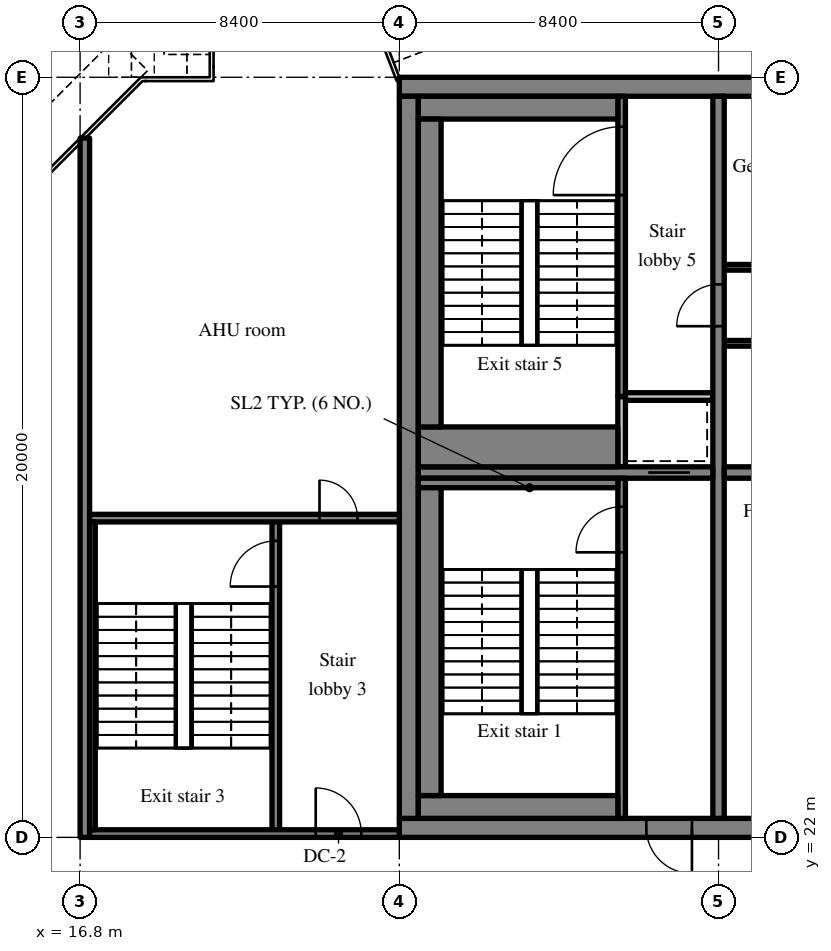
"""IFC4 building model, lengths in metres.
Left out: names, types, materials, properties, quantities, classifications, styles, units other than length and angle.
Written with IfcOpenShell. Run it as: python <this file> out.ifc"""

import sys

from ifc_helpers import new_model, si_unit, direction, frame, frame_2d, origin, place, context, subcontext, project, spatial, rectangle, extrude, source, transform, mapped, element, fill, save


model = new_model("IFC4")
c1 = context("Model", 3, precision=1e-05, world=origin(), true_north=direction((0.0, 1.0)))
c2 = subcontext(c1, "Body", "Model", "MODEL_VIEW")
j1 = project(units=[si_unit("LENGTHUNIT", "METRE"), si_unit("PLANEANGLEUNIT", "RADIAN")], contexts=[c1])
p1 = place(None, origin())
s1 = spatial("IfcSite", under=j1, at=p1, CompositionType="ELEMENT")
p2 = place(p1, origin())
s2 = spatial("IfcBuilding", under=s1, at=p2, CompositionType="ELEMENT")
p3 = place(p2, frame((0.0, 0.0, 317.7)))
s3 = spatial("IfcBuildingStorey", under=s2, at=p3, CompositionType="ELEMENT", Elevation=317.7)
m1 = source(origin(), c2, "Body", "SweptSolid", [
    extrude(rectangle(XDim=50.4, YDim=0.5, at=frame_2d((25.2, 0.0))), origin(), (0.0, 0.0, 1.0), 5.72),
])
p4 = place(p3, frame((25.2, 22.25, 0.0), z_axis=(0.0, 0.0, 1.0), x_axis=(1.0, 0.0, 0.0)))
e1 = element("IfcWall", 1, at=p4, inside=s3, PredefinedType="SHEAR", context=c2, shape_type="MappedRepresentation", body=[
    mapped(m1, transform((0.0, 0.0, 0.0), scale=1.0)),
])
m2 = source(origin(), c2, "Body", "SweptSolid", [
    extrude(rectangle(XDim=1.8, YDim=2.1, at=frame_2d((0.9, 1.05))), frame((0.0, 0.26, 0.0), z_axis=(0.0, -1.0, 0.0), x_axis=(1.0, 0.0, 0.0)), (0.0, 0.0, 1.0), 0.52),
])
p5 = place(p4, frame((15.9, 0.0, 0.0)))
e2 = element("IfcOpeningElement", 2, at=p5, cuts=e1, PredefinedType="OPENING", context=c2, shape_type="MappedRepresentation", body=[
    mapped(m2, transform((0.0, 0.0, 0.0), scale=1.0)),
])
m3 = source(origin(), c2, "Body", "SweptSolid", [
    extrude(rectangle(XDim=0.9, YDim=2.1, at=frame_2d((0.45, 1.05))), frame((0.0, 0.26, 0.0), z_axis=(0.0, -1.0, 0.0), x_axis=(1.0, 0.0, 0.0)), (0.0, 0.0, 1.0), 0.52),
])
p6 = place(p4, frame((21.525, 0.0, 0.0)))
e3 = element("IfcOpeningElement", 3, at=p6, cuts=e1, PredefinedType="OPENING", context=c2, shape_type="MappedRepresentation", body=[
    mapped(m3, transform((0.0, 0.0, 0.0), scale=1.0)),
])
p7 = place(p4, frame((32.7, 0.0, 0.0)))
e4 = element("IfcOpeningElement", 4, at=p7, cuts=e1, PredefinedType="OPENING", context=c2, shape_type="MappedRepresentation", body=[
    mapped(m2, transform((0.0, 0.0, 0.0), scale=1.0)),
])
m4 = source(origin(), c2, "Body", "SweptSolid", [
    extrude(rectangle(XDim=1.2, YDim=2.1, at=frame_2d((0.6, 1.05))), frame((0.0, 0.26, 0.0), z_axis=(0.0, -1.0, 0.0), x_axis=(1.0, 0.0, 0.0)), (0.0, 0.0, 1.0), 0.52),
])
p8 = place(p4, frame((6.5, 0.0, 0.0)))
e5 = element("IfcOpeningElement", 5, at=p8, cuts=e1, PredefinedType="OPENING", context=c2, shape_type="MappedRepresentation", body=[
    mapped(m4, transform((0.0, 0.0, 0.0), scale=1.0)),
])
p9 = place(p4, frame((47.975, 0.0, 0.0)))
e6 = element("IfcOpeningElement", 6, at=p9, cuts=e1, PredefinedType="OPENING", context=c2, shape_type="MappedRepresentation", body=[
    mapped(m4, transform((0.0, 0.0, 0.0), scale=1.0)),
])
p10 = place(p3, frame((25.2, 41.75, 0.0), z_axis=(0.0, 0.0, 1.0), x_axis=(1.0, 0.0, 0.0)))
e7 = element("IfcWall", 7, at=p10, inside=s3, PredefinedType="SHEAR", context=c2, shape_type="MappedRepresentation", body=[
    mapped(m1, transform((0.0, 0.0, 0.0), scale=1.0)),
])
m5 = source(origin(), c2, "Body", "SweptSolid", [
    extrude(rectangle(XDim=19.0, YDim=0.5, at=frame_2d((9.5, 0.0))), origin(), (0.0, 0.0, 1.0), 5.72),
])
p11 = place(p3, frame((25.45, 22.5, 0.0), z_axis=(0.0, 0.0, 1.0), x_axis=(0.0, 1.0, 0.0)))
e8 = element("IfcWall", 8, at=p11, inside=s3, PredefinedType="SHEAR", context=c2, shape_type="MappedRepresentation", body=[
    mapped(m5, transform((0.0, 0.0, 0.0), scale=1.0)),
])
m6 = source(origin(), c2, "Body", "SweptSolid", [
    extrude(rectangle(XDim=19.0, YDim=0.3, at=frame_2d((9.5, 0.0))), origin(), (0.0, 0.0, 1.0), 5.72),
])
p12 = place(p3, frame((33.6, 22.5, 0.0), z_axis=(0.0, 0.0, 1.0), x_axis=(0.0, 1.0, 0.0)))
e9 = element("IfcWall", 9, at=p12, inside=s3, PredefinedType="SHEAR", context=c2, shape_type="MappedRepresentation", body=[
    mapped(m6, transform((0.0, 0.0, 0.0), scale=1.0)),
])
m7 = source(origin(), c2, "Body", "SweptSolid", [
    extrude(rectangle(XDim=1.1, YDim=2.1, at=frame_2d((0.55, 1.05))), frame((0.0, 0.16, 0.0), z_axis=(0.0, -1.0, 0.0), x_axis=(1.0, 0.0, 0.0)), (0.0, 0.0, 1.0), 0.32),
])
p13 = place(p12, frame((12.95, 0.0, 0.0)))
e10 = element("IfcOpeningElement", 10, at=p13, cuts=e9, PredefinedType="OPENING", context=c2, shape_type="MappedRepresentation", body=[
    mapped(m7, transform((0.0, 0.0, 0.0), scale=1.0)),
])
m8 = source(origin(), c2, "Body", "SweptSolid", [
    extrude(rectangle(XDim=7.75, YDim=0.3, at=frame_2d((3.875, 0.0))), origin(), (0.0, 0.0, 1.0), 5.72),
])
p14 = place(p3, frame((25.7, 31.6, 0.0), z_axis=(0.0, 0.0, 1.0), x_axis=(1.0, 0.0, 0.0)))
e11 = element("IfcWall", 11, at=p14, inside=s3, PredefinedType="SHEAR", context=c2, shape_type="MappedRepresentation", body=[
    mapped(m8, transform((0.0, 0.0, 0.0), scale=1.0)),
])
p15 = place(p14, frame((6.05, 0.0, 0.0)))
e12 = element("IfcOpeningElement", 12, at=p15, cuts=e11, PredefinedType="OPENING", context=c2, shape_type="MappedRepresentation", body=[
    mapped(m7, transform((0.0, 0.0, 0.0), scale=1.0)),
])
m9 = source(origin(), c2, "Body", "SweptSolid", [
    extrude(rectangle(XDim=16.5, YDim=0.3, at=frame_2d((8.25, 0.0))), origin(), (0.0, 0.0, 1.0), 5.72),
])
p16 = place(p3, frame((33.75, 31.6, 0.0), z_axis=(0.0, 0.0, 1.0), x_axis=(1.0, 0.0, 0.0)))
e13 = element("IfcWall", 13, at=p16, inside=s3, PredefinedType="SHEAR", context=c2, shape_type="MappedRepresentation", body=[
    mapped(m9, transform((0.0, 0.0, 0.0), scale=1.0)),
])
m10 = source(origin(), c2, "Body", "SweptSolid", [
    extrude(rectangle(XDim=1.0, YDim=2.1, at=frame_2d((0.5, 1.05))), frame((0.0, 0.16, 0.0), z_axis=(0.0, -1.0, 0.0), x_axis=(1.0, 0.0, 0.0)), (0.0, 0.0, 1.0), 0.32),
])
p17 = place(p16, frame((14.875, 0.0, 0.0)))
e14 = element("IfcOpeningElement", 14, at=p17, cuts=e13, PredefinedType="OPENING", context=c2, shape_type="MappedRepresentation", body=[
    mapped(m10, transform((0.0, 0.0, 0.0), scale=1.0)),
])
m11 = source(origin(), c2, "Body", "SweptSolid", [
    extrude(rectangle(XDim=18.4, YDim=0.25, at=frame_2d((9.2, 0.0))), origin(), (0.0, 0.0, 1.0), 5.72),
])
p18 = place(p3, frame((16.925, 22.0, 0.0), z_axis=(0.0, 0.0, 1.0), x_axis=(0.0, 1.0, 0.0)))
e15 = element("IfcWall", 15, at=p18, inside=s3, PredefinedType="SHEAR", context=c2, shape_type="MappedRepresentation", body=[
    mapped(m11, transform((0.0, 0.0, 0.0), scale=1.0)),
])
m12 = source(origin(), c2, "Body", "SweptSolid", [
    extrude(rectangle(XDim=14.25, YDim=0.15, at=frame_2d((7.125, 0.0))), origin(), (0.0, 0.0, 1.0), 5.72),
])
p19 = place(p3, frame((33.75, 35.0, 0.0), z_axis=(0.0, 0.0, 1.0), x_axis=(1.0, 0.0, 0.0)))
e16 = element("IfcWall", 16, at=p19, inside=s3, PredefinedType="PARTITIONING", context=c2, shape_type="MappedRepresentation", body=[
    mapped(m12, transform((0.0, 0.0, 0.0), scale=1.0)),
])
m13 = source(origin(), c2, "Body", "SweptSolid", [
    extrude(rectangle(XDim=0.9, YDim=2.1, at=frame_2d((0.45, 1.05))), frame((0.0, 0.085, 0.0), z_axis=(0.0, -1.0, 0.0), x_axis=(1.0, 0.0, 0.0)), (0.0, 0.0, 1.0), 0.17),
])
p20 = place(p19, frame((6.637, 0.0, 0.0)))
e17 = element("IfcOpeningElement", 17, at=p20, cuts=e16, PredefinedType="OPENING", context=c2, shape_type="MappedRepresentation", body=[
    mapped(m13, transform((0.0, 0.0, 0.0), scale=1.0)),
])
m14 = source(origin(), c2, "Body", "SweptSolid", [
    extrude(rectangle(XDim=16.5, YDim=0.15, at=frame_2d((8.25, 0.0))), origin(), (0.0, 0.0, 1.0), 5.72),
])
p21 = place(p3, frame((33.75, 37.0, 0.0), z_axis=(0.0, 0.0, 1.0), x_axis=(1.0, 0.0, 0.0)))
e18 = element("IfcWall", 18, at=p21, inside=s3, PredefinedType="PARTITIONING", context=c2, shape_type="MappedRepresentation", body=[
    mapped(m14, transform((0.0, 0.0, 0.0), scale=1.0)),
])
p22 = place(p21, frame((0.787, 0.0, 0.0)))
e19 = element("IfcOpeningElement", 19, at=p22, cuts=e18, PredefinedType="OPENING", context=c2, shape_type="MappedRepresentation", body=[
    mapped(m13, transform((0.0, 0.0, 0.0), scale=1.0)),
])
p23 = place(p21, frame((3.675, 0.0, 0.0)))
e20 = element("IfcOpeningElement", 20, at=p23, cuts=e18, PredefinedType="OPENING", context=c2, shape_type="MappedRepresentation", body=[
    mapped(m13, transform((0.0, 0.0, 0.0), scale=1.0)),
])
p24 = place(p21, frame((9.45, 0.0, 0.0)))
e21 = element("IfcOpeningElement", 21, at=p24, cuts=e18, PredefinedType="OPENING", context=c2, shape_type="MappedRepresentation", body=[
    mapped(m13, transform((0.0, 0.0, 0.0), scale=1.0)),
])
p25 = place(p21, frame((14.813, 0.0, 0.0)))
e22 = element("IfcOpeningElement", 22, at=p25, cuts=e18, PredefinedType="OPENING", context=c2, shape_type="MappedRepresentation", body=[
    mapped(m13, transform((0.0, 0.0, 0.0), scale=1.0)),
])
m15 = source(origin(), c2, "Body", "SweptSolid", [
    extrude(rectangle(XDim=8.95, YDim=0.2, at=frame_2d((4.475, 0.0))), origin(), (0.0, 0.0, 1.0), 5.72),
])
p26 = place(p3, frame((31.05, 22.5, 0.0), z_axis=(0.0, 0.0, 1.0), x_axis=(0.0, 1.0, 0.0)))
e23 = element("IfcWall", 23, at=p26, inside=s3, PredefinedType="SOLIDWALL", context=c2, shape_type="MappedRepresentation", body=[
    mapped(m15, transform((0.0, 0.0, 0.0), scale=1.0)),
])
m16 = source(origin(), c2, "Body", "SweptSolid", [
    extrude(rectangle(XDim=1.2, YDim=2.1, at=frame_2d((0.6, 1.05))), frame((0.0, 0.11, 0.0), z_axis=(0.0, -1.0, 0.0), x_axis=(1.0, 0.0, 0.0)), (0.0, 0.0, 1.0), 0.22),
])
p27 = place(p26, frame((7.0, 0.0, 0.0)))
e24 = element("IfcOpeningElement", 24, at=p27, cuts=e23, PredefinedType="OPENING", context=c2, shape_type="MappedRepresentation", body=[
    mapped(m16, transform((0.0, 0.0, 0.0), scale=1.0)),
])
m17 = source(origin(), c2, "Body", "SweptSolid", [
    extrude(rectangle(XDim=1.85, YDim=0.2, at=frame_2d((0.925, 0.0))), origin(), (0.0, 0.0, 1.0), 5.72),
])
p28 = place(p3, frame((31.05, 31.75, 0.0), z_axis=(0.0, 0.0, 1.0), x_axis=(0.0, 1.0, 0.0)))
e25 = element("IfcWall", 25, at=p28, inside=s3, PredefinedType="SOLIDWALL", context=c2, shape_type="MappedRepresentation", body=[
    mapped(m17, transform((0.0, 0.0, 0.0), scale=1.0)),
])
m18 = source(origin(), c2, "Body", "SweptSolid", [
    extrude(rectangle(XDim=2.3, YDim=0.2, at=frame_2d((1.15, 0.0))), origin(), (0.0, 0.0, 1.0), 5.72),
])
p29 = place(p3, frame((31.15, 33.6, 0.0), z_axis=(0.0, 0.0, 1.0), x_axis=(1.0, 0.0, 0.0)))
e26 = element("IfcWall", 26, at=p29, inside=s3, PredefinedType="SOLIDWALL", context=c2, shape_type="MappedRepresentation", body=[
    mapped(m18, transform((0.0, 0.0, 0.0), scale=1.0)),
])
m19 = source(origin(), c2, "Body", "SweptSolid", [
    extrude(rectangle(XDim=7.9, YDim=0.2, at=frame_2d((3.95, 0.0))), origin(), (0.0, 0.0, 1.0), 5.72),
])
p30 = place(p3, frame((31.05, 33.6, 0.0), z_axis=(0.0, 0.0, 1.0), x_axis=(0.0, 1.0, 0.0)))
e27 = element("IfcWall", 27, at=p30, inside=s3, PredefinedType="SOLIDWALL", context=c2, shape_type="MappedRepresentation", body=[
    mapped(m19, transform((0.0, 0.0, 0.0), scale=1.0)),
])
m20 = source(origin(), c2, "Body", "SweptSolid", [
    extrude(rectangle(XDim=1.8, YDim=2.1, at=frame_2d((0.9, 1.05))), frame((0.0, 0.11, 0.0), z_axis=(0.0, -1.0, 0.0), x_axis=(1.0, 0.0, 0.0)), (0.0, 0.0, 1.0), 0.22),
])
p31 = place(p30, frame((5.3, 0.0, 0.0)))
e28 = element("IfcOpeningElement", 28, at=p31, cuts=e27, PredefinedType="OPENING", context=c2, shape_type="MappedRepresentation", body=[
    mapped(m20, transform((0.0, 0.0, 0.0), scale=1.0)),
])
m21 = source(origin(), c2, "Body", "SweptSolid", [
    extrude(rectangle(XDim=8.3, YDim=0.2, at=frame_2d((4.15, 0.0))), origin(), (0.0, 0.0, 1.0), 5.72),
])
p32 = place(p3, frame((21.95, 22.1, 0.0), z_axis=(0.0, 0.0, 1.0), x_axis=(0.0, 1.0, 0.0)))
e29 = element("IfcWall", 29, at=p32, inside=s3, PredefinedType="SOLIDWALL", context=c2, shape_type="MappedRepresentation", body=[
    mapped(m21, transform((0.0, 0.0, 0.0), scale=1.0)),
])
p33 = place(p32, frame((6.5, 0.0, 0.0)))
e30 = element("IfcOpeningElement", 30, at=p33, cuts=e29, PredefinedType="OPENING", context=c2, shape_type="MappedRepresentation", body=[
    mapped(m16, transform((0.0, 0.0, 0.0), scale=1.0)),
])
m22 = source(origin(), c2, "Body", "SweptSolid", [
    extrude(rectangle(XDim=8.15, YDim=0.2, at=frame_2d((4.075, 0.0))), origin(), (0.0, 0.0, 1.0), 5.72),
])
p34 = place(p3, frame((17.05, 22.1, 0.0), z_axis=(0.0, 0.0, 1.0), x_axis=(1.0, 0.0, 0.0)))
e31 = element("IfcWall", 31, at=p34, inside=s3, PredefinedType="SOLIDWALL", context=c2, shape_type="MappedRepresentation", body=[
    mapped(m22, transform((0.0, 0.0, 0.0), scale=1.0)),
])
p35 = place(p34, frame((5.95, 0.0, 0.0)))
e32 = element("IfcOpeningElement", 32, at=p35, cuts=e31, PredefinedType="OPENING", context=c2, shape_type="MappedRepresentation", body=[
    mapped(m16, transform((0.0, 0.0, 0.0), scale=1.0)),
])
p36 = place(p3, frame((17.05, 30.4, 0.0), z_axis=(0.0, 0.0, 1.0), x_axis=(1.0, 0.0, 0.0)))
e33 = element("IfcWall", 33, at=p36, inside=s3, PredefinedType="SOLIDWALL", context=c2, shape_type="MappedRepresentation", body=[
    mapped(m22, transform((0.0, 0.0, 0.0), scale=1.0)),
])
m23 = source(origin(), c2, "Body", "SweptSolid", [
    extrude(rectangle(XDim=1.0, YDim=2.1, at=frame_2d((0.5, 1.05))), frame((0.0, 0.11, 0.0), z_axis=(0.0, -1.0, 0.0), x_axis=(1.0, 0.0, 0.0)), (0.0, 0.0, 1.0), 0.22),
])
p37 = place(p36, frame((6.05, 0.0, 0.0)))
e34 = element("IfcOpeningElement", 34, at=p37, cuts=e33, PredefinedType="OPENING", context=c2, shape_type="MappedRepresentation", body=[
    mapped(m23, transform((0.0, 0.0, 0.0), scale=1.0)),
])
m24 = source(origin(), c2, "Body", "SweptSolid", [
    extrude(rectangle(XDim=5.25, YDim=0.6, at=frame_2d((2.625, 0.0))), origin(), (0.0, 0.0, 1.0), 5.72),
])
p38 = place(p3, frame((25.7, 22.8, 0.0), z_axis=(0.0, 0.0, 1.0), x_axis=(1.0, 0.0, 0.0)))
e35 = element("IfcWall", 35, at=p38, inside=s3, PredefinedType="SOLIDWALL", context=c2, shape_type="MappedRepresentation", body=[
    mapped(m24, transform((0.0, 0.0, 0.0), scale=1.0)),
])
m25 = source(origin(), c2, "Body", "SweptSolid", [
    extrude(rectangle(XDim=5.25, YDim=0.25, at=frame_2d((2.625, 0.0))), origin(), (0.0, 0.0, 1.0), 5.72),
])
p39 = place(p3, frame((25.7, 31.325, 0.0), z_axis=(0.0, 0.0, 1.0), x_axis=(1.0, 0.0, 0.0)))
e36 = element("IfcWall", 36, at=p39, inside=s3, PredefinedType="SOLIDWALL", context=c2, shape_type="MappedRepresentation", body=[
    mapped(m25, transform((0.0, 0.0, 0.0), scale=1.0)),
])
m26 = source(origin(), c2, "Body", "SweptSolid", [
    extrude(rectangle(XDim=8.1, YDim=0.6, at=frame_2d((4.05, 0.0))), origin(), (0.0, 0.0, 1.0), 5.72),
])
p40 = place(p3, frame((26.0, 23.1, 0.0), z_axis=(0.0, 0.0, 1.0), x_axis=(0.0, 1.0, 0.0)))
e37 = element("IfcWall", 37, at=p40, inside=s3, PredefinedType="SOLIDWALL", context=c2, shape_type="MappedRepresentation", body=[
    mapped(m26, transform((0.0, 0.0, 0.0), scale=1.0)),
])
m27 = source(origin(), c2, "Body", "SweptSolid", [
    extrude(rectangle(XDim=8.1, YDim=0.15, at=frame_2d((4.05, 0.0))), origin(), (0.0, 0.0, 1.0), 5.72),
])
p41 = place(p3, frame((17.125, 22.2, 0.0), z_axis=(0.0, 0.0, 1.0), x_axis=(0.0, 1.0, 0.0)))
e38 = element("IfcWall", 38, at=p41, inside=s3, PredefinedType="SOLIDWALL", context=c2, shape_type="MappedRepresentation", body=[
    mapped(m27, transform((0.0, 0.0, 0.0), scale=1.0)),
])
p42 = place(p3, frame((25.7, 41.2, 0.0), z_axis=(0.0, 0.0, 1.0), x_axis=(1.0, 0.0, 0.0)))
e39 = element("IfcWall", 39, at=p42, inside=s3, PredefinedType="SOLIDWALL", context=c2, shape_type="MappedRepresentation", body=[
    mapped(m24, transform((0.0, 0.0, 0.0), scale=1.0)),
])
m28 = source(origin(), c2, "Body", "SweptSolid", [
    extrude(rectangle(XDim=5.25, YDim=1.05, at=frame_2d((2.625, 0.0))), origin(), (0.0, 0.0, 1.0), 5.72),
])
p43 = place(p3, frame((25.7, 32.275, 0.0), z_axis=(0.0, 0.0, 1.0), x_axis=(1.0, 0.0, 0.0)))
e40 = element("IfcWall", 40, at=p43, inside=s3, PredefinedType="SOLIDWALL", context=c2, shape_type="MappedRepresentation", body=[
    mapped(m28, transform((0.0, 0.0, 0.0), scale=1.0)),
])
p44 = place(p3, frame((26.0, 32.8, 0.0), z_axis=(0.0, 0.0, 1.0), x_axis=(0.0, 1.0, 0.0)))
e41 = element("IfcWall", 41, at=p44, inside=s3, PredefinedType="SOLIDWALL", context=c2, shape_type="MappedRepresentation", body=[
    mapped(m26, transform((0.0, 0.0, 0.0), scale=1.0)),
])
m29 = source(origin(), c2, "Body", "SweptSolid", [
    extrude(rectangle(XDim=1.2, YDim=2.1, at=frame_2d((0.6, 1.05))), frame((0.0, 0.025, 0.0), z_axis=(0.0, -1.0, 0.0), x_axis=(1.0, 0.0, 0.0)), (0.0, 0.0, 1.0), 0.05),
])
p45 = place(p27, origin())
e42 = element("IfcDoor", 42, at=p45, inside=s3, OperationType="SINGLE_SWING_LEFT", PredefinedType="DOOR", context=c2, shape_type="MappedRepresentation", body=[
    mapped(m29, transform((0.0, 0.0, 0.0), scale=1.0)),
])
fill(e24, e42)
m30 = source(origin(), c2, "Body", "SweptSolid", [
    extrude(rectangle(XDim=1.2, YDim=2.1, at=frame_2d((0.6, 1.05))), frame((0.0, 0.175, 0.0), z_axis=(0.0, -1.0, 0.0), x_axis=(1.0, 0.0, 0.0)), (0.0, 0.0, 1.0), 0.05),
])
p46 = place(p8, origin())
e43 = element("IfcDoor", 43, at=p46, inside=s3, OperationType="SINGLE_SWING_RIGHT", PredefinedType="DOOR", context=c2, shape_type="MappedRepresentation", body=[
    mapped(m30, transform((0.0, 0.0, 0.0), scale=1.0)),
])
fill(e5, e43)
m31 = source(origin(), c2, "Body", "SweptSolid", [
    extrude(rectangle(XDim=1.1, YDim=2.1, at=frame_2d((0.55, 1.05))), frame((0.0, 0.025, 0.0), z_axis=(0.0, -1.0, 0.0), x_axis=(1.0, 0.0, 0.0)), (0.0, 0.0, 1.0), 0.05),
])
p47 = place(p15, origin())
e44 = element("IfcDoor", 44, at=p47, inside=s3, OperationType="SLIDING_TO_RIGHT", PredefinedType="DOOR", context=c2, shape_type="MappedRepresentation", body=[
    mapped(m31, transform((0.0, 0.0, 0.0), scale=1.0)),
])
fill(e12, e44)
m32 = source(origin(), c2, "Body", "SweptSolid", [
    extrude(rectangle(XDim=1.8, YDim=2.1, at=frame_2d((0.9, 1.05))), frame((0.0, 0.025, 0.0), z_axis=(0.0, -1.0, 0.0), x_axis=(1.0, 0.0, 0.0)), (0.0, 0.0, 1.0), 0.05),
])
p48 = place(p31, origin())
e45 = element("IfcDoor", 45, at=p48, inside=s3, OperationType="SINGLE_SWING_LEFT", PredefinedType="DOOR", context=c2, shape_type="MappedRepresentation", body=[
    mapped(m32, transform((0.0, 0.0, 0.0), scale=1.0)),
])
fill(e28, e45)
p49 = place(p33, origin())
e46 = element("IfcDoor", 46, at=p49, inside=s3, OperationType="SINGLE_SWING_LEFT", PredefinedType="DOOR", context=c2, shape_type="MappedRepresentation", body=[
    mapped(m29, transform((0.0, 0.0, 0.0), scale=1.0)),
])
fill(e30, e46)
p50 = place(p35, origin())
e47 = element("IfcDoor", 47, at=p50, inside=s3, OperationType="SINGLE_SWING_LEFT", PredefinedType="DOOR", context=c2, shape_type="MappedRepresentation", body=[
    mapped(m29, transform((0.0, 0.0, 0.0), scale=1.0)),
])
fill(e32, e47)
m33 = source(origin(), c2, "Body", "SweptSolid", [
    extrude(rectangle(XDim=1.0, YDim=2.1, at=frame_2d((0.5, 1.05))), frame((0.0, 0.025, 0.0), z_axis=(0.0, -1.0, 0.0), x_axis=(1.0, 0.0, 0.0)), (0.0, 0.0, 1.0), 0.05),
])
p51 = place(p37, origin())
e48 = element("IfcDoor", 48, at=p51, inside=s3, OperationType="SINGLE_SWING_LEFT", PredefinedType="DOOR", context=c2, shape_type="MappedRepresentation", body=[
    mapped(m33, transform((0.0, 0.0, 0.0), scale=1.0)),
])
fill(e34, e48)
p52 = place(p13, origin())
e49 = element("IfcDoor", 49, at=p52, inside=s3, OperationType="SINGLE_SWING_LEFT", PredefinedType="DOOR", context=c2, shape_type="MappedRepresentation", body=[
    mapped(m31, transform((0.0, 0.0, 0.0), scale=1.0)),
])
fill(e10, e49)
save(model, sys.argv[1])
